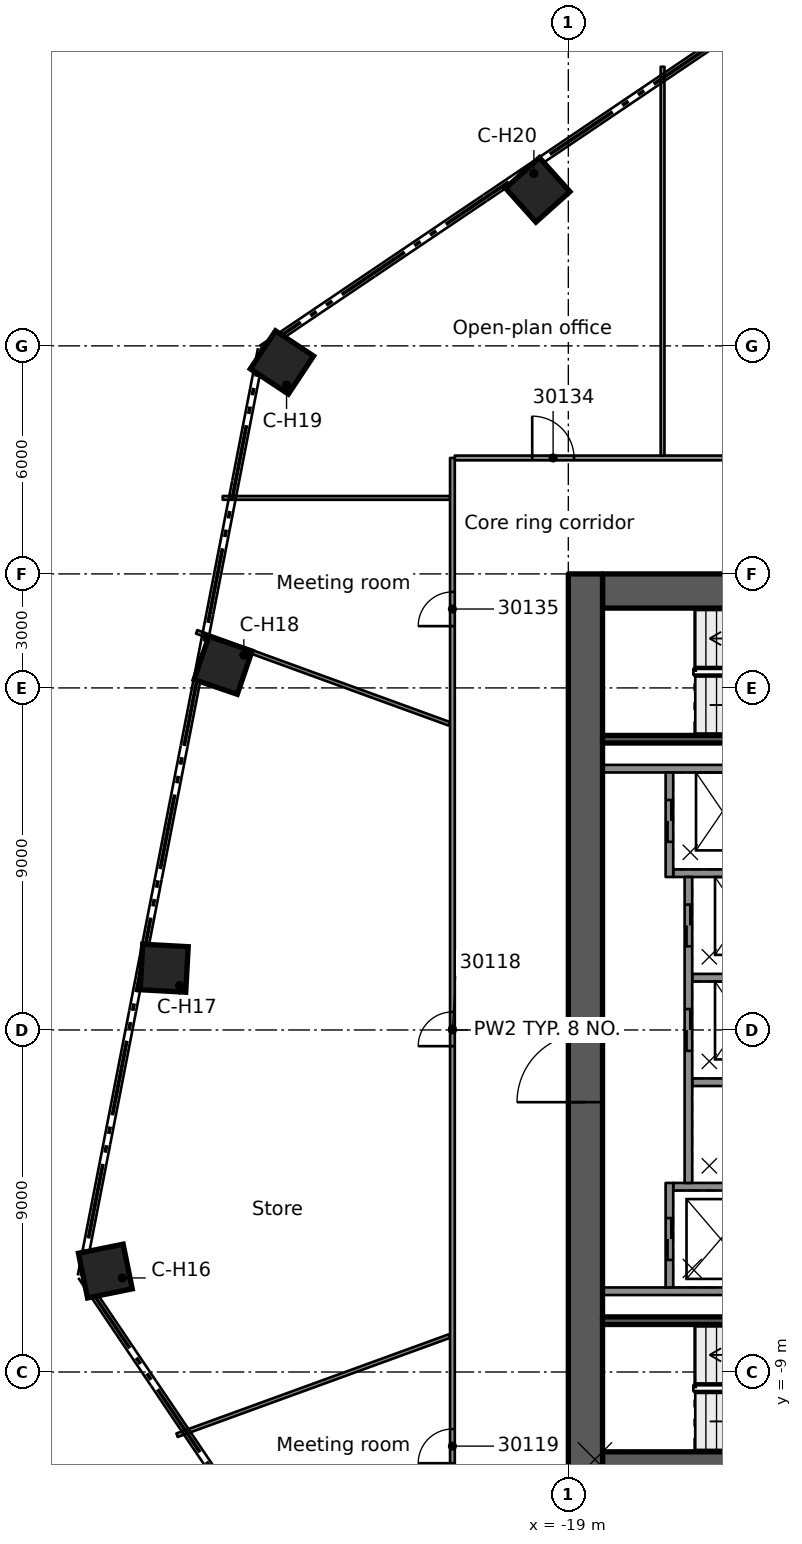
"""IFC4 building model, lengths in metres.
Left out: names, types, materials, properties, quantities, classifications, styles, units other than length and angle.
Written with IfcOpenShell. Run it as: python <this file> out.ifc"""

import sys

from ifc_helpers import new_model, si_unit, direction, frame, frame_2d, origin, origin_2d, place, context, subcontext, project, spatial, rectangle, extrude, element, fill, save


model = new_model("IFC4")
c1 = context("Model", 3, precision=1e-05, world=origin(), true_north=direction((0.0, 1.0)))
c2 = subcontext(c1, "Body", "Model", "MODEL_VIEW")
j1 = project(units=[si_unit("LENGTHUNIT", "METRE"), si_unit("PLANEANGLEUNIT", "RADIAN")], contexts=[c1])
p1 = place(None, origin())
s1 = spatial("IfcSite", under=j1, at=p1, CompositionType="ELEMENT")
p2 = place(p1, origin())
s2 = spatial("IfcBuilding", under=s1, at=p2, CompositionType="ELEMENT")
p3 = place(p2, frame((0.0, 0.0, 152.6)))
s3 = spatial("IfcBuildingStorey", under=s2, at=p3, CompositionType="ELEMENT", Elevation=152.6)
p4 = place(p3, frame((-18.1, 11.55, 0.0), z_axis=(0.0, 0.0, 1.0), x_axis=(1.0, 0.0, 0.0)))
e1 = element("IfcWall", 1, at=p4, inside=s3, PredefinedType="SHEAR", context=c2, shape_type="SweptSolid", body=[
    extrude(rectangle(XDim=9.2, YDim=0.9, at=frame_2d((4.6, 0.0))), origin(), (0.0, 0.0, 1.0), 3.5),
])
p5 = place(p4, frame((5.1, 0.0, 0.0)))
e2 = element("IfcOpeningElement", 2, at=p5, cuts=e1, PredefinedType="OPENING", context=c2, shape_type="SweptSolid", body=[
    extrude(rectangle(XDim=1.1, YDim=2.1, at=frame_2d((0.55, 1.05))), frame((0.0, 0.46, 0.0), z_axis=(0.0, -1.0, 0.0), x_axis=(1.0, 0.0, 0.0)), (0.0, 0.0, 1.0), 0.92),
])
p6 = place(p3, frame((-18.1, -11.55, 0.0), z_axis=(0.0, 0.0, 1.0), x_axis=(1.0, 0.0, 0.0)))
e3 = element("IfcWall", 3, at=p6, inside=s3, PredefinedType="SHEAR", context=c2, shape_type="SweptSolid", body=[
    extrude(rectangle(XDim=9.2, YDim=0.9, at=frame_2d((4.6, 0.0))), origin(), (0.0, 0.0, 1.0), 3.5),
])
p7 = place(p6, frame((5.1, 0.0, 0.0)))
e4 = element("IfcOpeningElement", 4, at=p7, cuts=e3, PredefinedType="OPENING", context=c2, shape_type="SweptSolid", body=[
    extrude(rectangle(XDim=1.1, YDim=2.1, at=frame_2d((0.55, 1.05))), frame((0.0, 0.46, 0.0), z_axis=(0.0, -1.0, 0.0), x_axis=(1.0, 0.0, 0.0)), (0.0, 0.0, 1.0), 0.92),
])
p8 = place(p6, frame((7.53, 0.0, 0.0)))
e5 = element("IfcOpeningElement", 5, at=p8, cuts=e3, PredefinedType="OPENING", context=c2, shape_type="SweptSolid", body=[
    extrude(rectangle(XDim=0.9, YDim=2.1, at=frame_2d((0.45, 1.05))), frame((0.0, 0.46, 0.0), z_axis=(0.0, -1.0, 0.0), x_axis=(1.0, 0.0, 0.0)), (0.0, 0.0, 1.0), 0.92),
])
p9 = place(p3, frame((-18.55, -12.0, 0.0), z_axis=(0.0, 0.0, 1.0), x_axis=(0.0, 1.0, 0.0)))
e6 = element("IfcWall", 6, at=p9, inside=s3, PredefinedType="SHEAR", context=c2, shape_type="SweptSolid", body=[
    extrude(rectangle(XDim=24.0, YDim=0.9, at=frame_2d((12.0, 0.0))), origin(), (0.0, 0.0, 1.0), 3.5),
])
p10 = place(p9, frame((10.1, 0.0, 0.0)))
e7 = element("IfcOpeningElement", 7, at=p10, cuts=e6, PredefinedType="OPENING", context=c2, shape_type="SweptSolid", body=[
    extrude(rectangle(XDim=1.8, YDim=2.1, at=frame_2d((0.9, 1.05))), frame((0.0, 0.46, 0.0), z_axis=(0.0, -1.0, 0.0), x_axis=(1.0, 0.0, 0.0)), (0.0, 0.0, 1.0), 0.92),
])
for number, where, z_axis, x_axis in (
    (8, (-31.183, -6.344, 0.0), (0.0, 0.0, 1.0), (-0.98, -0.199, 0.0)),
    (9, (-29.634, 1.625, 0.0), (0.0, 0.0, 1.0), (-0.998, 0.055, 0.0)),
    (10, (-28.085, 9.594, 0.0), (0.0, 0.0, 1.0), (-0.946, 0.323, 0.0)),
    (11, (-26.536, 17.564, 0.0), (0.0, 0.0, 1.0), (-0.834, 0.552, 0.0)),
    (12, (-19.806, 22.104, 0.0), (0.0, 0.0, 1.0), (-0.667, 0.745, 0.0)),
):
    element("IfcColumn", number, at=place(p3, frame(where, z_axis=z_axis, x_axis=x_axis)), inside=s3, PredefinedType="COLUMN", context=c2, shape_type="SweptSolid", body=[
        extrude(rectangle(XDim=1.2, YDim=1.2, at=origin_2d()), origin(), (0.0, 0.0, 1.0), 3.5),
    ])
for number, where, z_axis, x_axis in (
    (13, (-11.54, 6.875, 0.0), (0.0, 0.0, 1.0), (-1.0, 0.0, 0.0)),
    (14, (-11.54, -6.875, 0.0), (0.0, 0.0, 1.0), (-1.0, 0.0, 0.0)),
):
    element("IfcWall", number, at=place(p3, frame(where, z_axis=z_axis, x_axis=x_axis)), inside=s3, PredefinedType="SOLIDWALL", context=c2, shape_type="SweptSolid", body=[
        extrude(rectangle(XDim=6.56, YDim=0.2, at=frame_2d((3.28, 0.0))), origin(), (0.0, 0.0, 1.0), 3.09),
    ])
p11 = place(p3, frame((-13.74, -4.125, 0.0), z_axis=(0.0, 0.0, 1.0), x_axis=(-1.0, 0.0, 0.0)))
e15 = element("IfcWall", 15, at=p11, inside=s3, PredefinedType="SOLIDWALL", context=c2, shape_type="SweptSolid", body=[
    extrude(rectangle(XDim=2.5, YDim=0.2, at=frame_2d((1.25, 0.0))), origin(), (0.0, 0.0, 1.0), 3.09),
])
p12 = place(p3, frame((-13.74, -1.375, 0.0), z_axis=(0.0, 0.0, 1.0), x_axis=(-1.0, 0.0, 0.0)))
e16 = element("IfcWall", 16, at=p12, inside=s3, PredefinedType="SOLIDWALL", context=c2, shape_type="SweptSolid", body=[
    extrude(rectangle(XDim=2.0, YDim=0.2, at=frame_2d((1.0, 0.0))), origin(), (0.0, 0.0, 1.0), 3.09),
])
p13 = place(p3, frame((-11.54, 1.375, 0.0), z_axis=(0.0, 0.0, 1.0), x_axis=(-1.0, 0.0, 0.0)))
e17 = element("IfcWall", 17, at=p13, inside=s3, PredefinedType="SOLIDWALL", context=c2, shape_type="SweptSolid", body=[
    extrude(rectangle(XDim=4.2, YDim=0.2, at=frame_2d((2.1, 0.0))), origin(), (0.0, 0.0, 1.0), 3.09),
])
p14 = place(p3, frame((-11.54, 4.125, 0.0), z_axis=(0.0, 0.0, 1.0), x_axis=(-1.0, 0.0, 0.0)))
e18 = element("IfcWall", 18, at=p14, inside=s3, PredefinedType="SOLIDWALL", context=c2, shape_type="SweptSolid", body=[
    extrude(rectangle(XDim=4.7, YDim=0.2, at=frame_2d((2.35, 0.0))), origin(), (0.0, 0.0, 1.0), 3.09),
])
p15 = place(p3, frame((-16.34, -6.775, 0.0), z_axis=(0.0, 0.0, 1.0), x_axis=(0.0, 1.0, 0.0)))
e19 = element("IfcWall", 19, at=p15, inside=s3, PredefinedType="SOLIDWALL", context=c2, shape_type="SweptSolid", body=[
    extrude(rectangle(XDim=2.75, YDim=0.2, at=frame_2d((1.375, 0.0))), origin(), (0.0, 0.0, 1.0), 3.09),
])
p16 = place(p15, frame((0.725, 0.0, 0.0)))
e20 = element("IfcOpeningElement", 20, at=p16, cuts=e19, PredefinedType="OPENING", context=c2, shape_type="SweptSolid", body=[
    extrude(rectangle(XDim=1.1, YDim=2.1, at=frame_2d((0.55, 1.05))), frame((0.0, 0.11, 0.0), z_axis=(0.0, -1.0, 0.0), x_axis=(1.0, 0.0, 0.0)), (0.0, 0.0, 1.0), 0.22),
])
p17 = place(p3, frame((-15.84, -4.025, 0.0), z_axis=(0.0, 0.0, 1.0), x_axis=(0.0, 1.0, 0.0)))
e21 = element("IfcWall", 21, at=p17, inside=s3, PredefinedType="SOLIDWALL", context=c2, shape_type="SweptSolid", body=[
    extrude(rectangle(XDim=8.05, YDim=0.2, at=frame_2d((4.025, 0.0))), origin(), (0.0, 0.0, 1.0), 3.09),
])
p18 = place(p17, frame((3.475, 0.0, 0.0)))
e22 = element("IfcOpeningElement", 22, at=p18, cuts=e21, PredefinedType="OPENING", context=c2, shape_type="SweptSolid", body=[
    extrude(rectangle(XDim=1.1, YDim=2.1, at=frame_2d((0.55, 1.05))), frame((0.0, 0.11, 0.0), z_axis=(0.0, -1.0, 0.0), x_axis=(1.0, 0.0, 0.0)), (0.0, 0.0, 1.0), 0.22),
])
p19 = place(p17, frame((6.225, 0.0, 0.0)))
e23 = element("IfcOpeningElement", 23, at=p19, cuts=e21, PredefinedType="OPENING", context=c2, shape_type="SweptSolid", body=[
    extrude(rectangle(XDim=1.1, YDim=2.1, at=frame_2d((0.55, 1.05))), frame((0.0, 0.11, 0.0), z_axis=(0.0, -1.0, 0.0), x_axis=(1.0, 0.0, 0.0)), (0.0, 0.0, 1.0), 0.22),
])
p20 = place(p3, frame((-16.34, 4.025, 0.0), z_axis=(0.0, 0.0, 1.0), x_axis=(0.0, 1.0, 0.0)))
e24 = element("IfcWall", 24, at=p20, inside=s3, PredefinedType="SOLIDWALL", context=c2, shape_type="SweptSolid", body=[
    extrude(rectangle(XDim=2.75, YDim=0.2, at=frame_2d((1.375, 0.0))), origin(), (0.0, 0.0, 1.0), 3.09),
])
p21 = place(p20, frame((0.925, 0.0, 0.0)))
e25 = element("IfcOpeningElement", 25, at=p21, cuts=e24, PredefinedType="OPENING", context=c2, shape_type="SweptSolid", body=[
    extrude(rectangle(XDim=1.1, YDim=2.1, at=frame_2d((0.55, 1.05))), frame((0.0, 0.11, 0.0), z_axis=(0.0, -1.0, 0.0), x_axis=(1.0, 0.0, 0.0)), (0.0, 0.0, 1.0), 0.22),
])
for number, where, z_axis, x_axis in (
    (26, (-11.54, 7.65, 0.0), (0.0, 0.0, 1.0), (-1.0, 0.0, 0.0)),
    (27, (-11.54, -7.65, 0.0), (0.0, 0.0, 1.0), (-1.0, 0.0, 0.0)),
):
    element("IfcWall", number, at=place(p3, frame(where, z_axis=z_axis, x_axis=x_axis)), inside=s3, PredefinedType="SOLIDWALL", context=c2, shape_type="SweptSolid", body=[
        extrude(rectangle(XDim=6.56, YDim=0.2, at=frame_2d((3.28, 0.0))), origin(), (0.0, 0.0, 1.0), 3.09),
    ])
p22 = place(p3, frame((-28.78, 10.475, 0.0), z_axis=(0.0, 0.0, 1.0), x_axis=(0.93970576126, -0.341984038011, 0.0)))
e28 = element("IfcWall", 28, at=p22, inside=s3, PredefinedType="PARTITIONING", context=c2, shape_type="SweptSolid", body=[
    extrude(rectangle(XDim=7.077, YDim=0.1, at=frame_2d((3.539, 0.0))), origin(), (0.0, 0.0, 1.0), 3.08),
])
p23 = place(p3, frame((-28.095, 14.0, 0.0), z_axis=(0.0, 0.0, 1.0), x_axis=(1.0, 0.0, 0.0)))
e29 = element("IfcWall", 29, at=p23, inside=s3, PredefinedType="PARTITIONING", context=c2, shape_type="SweptSolid", body=[
    extrude(rectangle(XDim=5.982, YDim=0.1, at=frame_2d((2.991, 0.0))), origin(), (0.0, 0.0, 1.0), 3.08),
])
p24 = place(p3, frame((-21.988, 15.051, 0.0), z_axis=(0.0, 0.0, 1.0), x_axis=(1.0, 0.0, 0.0)))
e30 = element("IfcWall", 30, at=p24, inside=s3, PredefinedType="PARTITIONING", context=c2, shape_type="SweptSolid", body=[
    extrude(rectangle(XDim=10.997, YDim=0.125, at=frame_2d((5.499, 0.0))), origin(), (0.0, 0.0, 1.0), 3.08),
])
p25 = place(p24, frame((2.038, 0.0, 0.0)))
e31 = element("IfcOpeningElement", 31, at=p25, cuts=e30, PredefinedType="OPENING", context=c2, shape_type="SweptSolid", body=[
    extrude(rectangle(XDim=1.1, YDim=2.1, at=frame_2d((0.55, 1.05))), frame((0.0, 0.073, 0.0), z_axis=(0.0, -1.0, 0.0), x_axis=(1.0, 0.0, 0.0)), (0.0, 0.0, 1.0), 0.145),
])
p26 = place(p3, frame((-29.296, -10.663, 0.0), z_axis=(0.0, 0.0, 1.0), x_axis=(0.9396952375, 0.342012953877, 0.0)))
e32 = element("IfcWall", 32, at=p26, inside=s3, PredefinedType="PARTITIONING", context=c2, shape_type="SweptSolid", body=[
    extrude(rectangle(XDim=7.626, YDim=0.1, at=frame_2d((3.813, 0.0))), origin(), (0.0, 0.0, 1.0), 3.08),
])
p27 = place(p3, frame((-16.52, 15.114, 0.0), z_axis=(0.0, 0.0, 1.0), x_axis=(0.0, 1.0, 0.0)))
e33 = element("IfcWall", 33, at=p27, inside=s3, PredefinedType="PARTITIONING", context=c2, shape_type="SweptSolid", body=[
    extrude(rectangle(XDim=10.231, YDim=0.1, at=frame_2d((5.115, 0.0))), origin(), (0.0, 0.0, 1.0), 3.08),
])
p28 = place(p3, frame((-22.05, -15.051, 0.0), z_axis=(0.0, 0.0, 1.0), x_axis=(0.0, 1.0, 0.0)))
e34 = element("IfcWall", 34, at=p28, inside=s3, PredefinedType="PARTITIONING", context=c2, shape_type="SweptSolid", body=[
    extrude(rectangle(XDim=30.102, YDim=0.125, at=frame_2d((15.051, 0.0))), origin(), (0.0, 0.0, 1.0), 3.08),
])
p29 = place(p28, frame((14.625, 0.0, 0.0)))
e35 = element("IfcOpeningElement", 35, at=p29, cuts=e34, PredefinedType="OPENING", context=c2, shape_type="SweptSolid", body=[
    extrude(rectangle(XDim=0.9, YDim=2.1, at=frame_2d((0.45, 1.05))), frame((0.0, 0.073, 0.0), z_axis=(0.0, -1.0, 0.0), x_axis=(1.0, 0.0, 0.0)), (0.0, 0.0, 1.0), 0.145),
])
p30 = place(p28, frame((3.651, 0.0, 0.0)))
e36 = element("IfcOpeningElement", 36, at=p30, cuts=e34, PredefinedType="OPENING", context=c2, shape_type="SweptSolid", body=[
    extrude(rectangle(XDim=0.9, YDim=2.1, at=frame_2d((0.45, 1.05))), frame((0.0, 0.073, 0.0), z_axis=(0.0, -1.0, 0.0), x_axis=(1.0, 0.0, 0.0)), (0.0, 0.0, 1.0), 0.145),
])
p31 = place(p28, frame((25.677, 0.0, 0.0)))
e37 = element("IfcOpeningElement", 37, at=p31, cuts=e34, PredefinedType="OPENING", context=c2, shape_type="SweptSolid", body=[
    extrude(rectangle(XDim=0.9, YDim=2.1, at=frame_2d((0.45, 1.05))), frame((0.0, 0.073, 0.0), z_axis=(0.0, -1.0, 0.0), x_axis=(1.0, 0.0, 0.0)), (0.0, 0.0, 1.0), 0.145),
])
p32 = place(p16, origin())
e38 = element("IfcDoor", 38, at=p32, inside=s3, OperationType="DOUBLE_DOOR_SLIDING", PredefinedType="DOOR", context=c2, shape_type="SweptSolid", body=[
    extrude(rectangle(XDim=1.1, YDim=2.1, at=frame_2d((0.55, 1.05))), frame((0.0, 0.025, 0.0), z_axis=(0.0, -1.0, 0.0), x_axis=(1.0, 0.0, 0.0)), (0.0, 0.0, 1.0), 0.05),
])
fill(e20, e38)
p33 = place(p18, origin())
e39 = element("IfcDoor", 39, at=p33, inside=s3, OperationType="DOUBLE_DOOR_SLIDING", PredefinedType="DOOR", context=c2, shape_type="SweptSolid", body=[
    extrude(rectangle(XDim=1.1, YDim=2.1, at=frame_2d((0.55, 1.05))), frame((0.0, 0.025, 0.0), z_axis=(0.0, -1.0, 0.0), x_axis=(1.0, 0.0, 0.0)), (0.0, 0.0, 1.0), 0.05),
])
fill(e22, e39)
p34 = place(p19, origin())
e40 = element("IfcDoor", 40, at=p34, inside=s3, OperationType="DOUBLE_DOOR_SLIDING", PredefinedType="DOOR", context=c2, shape_type="SweptSolid", body=[
    extrude(rectangle(XDim=1.1, YDim=2.1, at=frame_2d((0.55, 1.05))), frame((0.0, 0.025, 0.0), z_axis=(0.0, -1.0, 0.0), x_axis=(1.0, 0.0, 0.0)), (0.0, 0.0, 1.0), 0.05),
])
fill(e23, e40)
p35 = place(p21, origin())
e41 = element("IfcDoor", 41, at=p35, inside=s3, OperationType="DOUBLE_DOOR_SLIDING", PredefinedType="DOOR", context=c2, shape_type="SweptSolid", body=[
    extrude(rectangle(XDim=1.1, YDim=2.1, at=frame_2d((0.55, 1.05))), frame((0.0, 0.025, 0.0), z_axis=(0.0, -1.0, 0.0), x_axis=(1.0, 0.0, 0.0)), (0.0, 0.0, 1.0), 0.05),
])
fill(e25, e41)
p36 = place(p10, origin())
e42 = element("IfcDoor", 42, at=p36, inside=s3, OperationType="SINGLE_SWING_LEFT", PredefinedType="DOOR", context=c2, shape_type="SweptSolid", body=[
    extrude(rectangle(XDim=1.8, YDim=2.1, at=frame_2d((0.9, 1.05))), frame((0.0, 0.025, 0.0), z_axis=(0.0, -1.0, 0.0), x_axis=(1.0, 0.0, 0.0)), (0.0, 0.0, 1.0), 0.05),
])
fill(e7, e42)
p37 = place(p29, origin())
e43 = element("IfcDoor", 43, at=p37, inside=s3, OperationType="SINGLE_SWING_RIGHT", PredefinedType="DOOR", context=c2, shape_type="SweptSolid", body=[
    extrude(rectangle(XDim=0.9, YDim=2.1, at=frame_2d((0.45, 1.05))), frame((0.0, 0.025, 0.0), z_axis=(0.0, -1.0, 0.0), x_axis=(1.0, 0.0, 0.0)), (0.0, 0.0, 1.0), 0.05),
])
fill(e35, e43)
p38 = place(p30, origin())
e44 = element("IfcDoor", 44, at=p38, inside=s3, OperationType="SINGLE_SWING_LEFT", PredefinedType="DOOR", context=c2, shape_type="SweptSolid", body=[
    extrude(rectangle(XDim=0.9, YDim=2.1, at=frame_2d((0.45, 1.05))), frame((0.0, 0.025, 0.0), z_axis=(0.0, -1.0, 0.0), x_axis=(1.0, 0.0, 0.0)), (0.0, 0.0, 1.0), 0.05),
])
fill(e36, e44)
p39 = place(p25, origin())
e45 = element("IfcDoor", 45, at=p39, inside=s3, OperationType="SINGLE_SWING_LEFT", PredefinedType="DOOR", context=c2, shape_type="SweptSolid", body=[
    extrude(rectangle(XDim=1.1, YDim=2.1, at=frame_2d((0.55, 1.05))), frame((0.0, 0.025, 0.0), z_axis=(0.0, -1.0, 0.0), x_axis=(1.0, 0.0, 0.0)), (0.0, 0.0, 1.0), 0.05),
])
fill(e31, e45)
p40 = place(p31, origin())
e46 = element("IfcDoor", 46, at=p40, inside=s3, OperationType="SINGLE_SWING_RIGHT", PredefinedType="DOOR", context=c2, shape_type="SweptSolid", body=[
    extrude(rectangle(XDim=0.9, YDim=2.1, at=frame_2d((0.45, 1.05))), frame((0.0, 0.025, 0.0), z_axis=(0.0, -1.0, 0.0), x_axis=(1.0, 0.0, 0.0)), (0.0, 0.0, 1.0), 0.05),
])
fill(e37, e46)
save(model, sys.argv[1])
